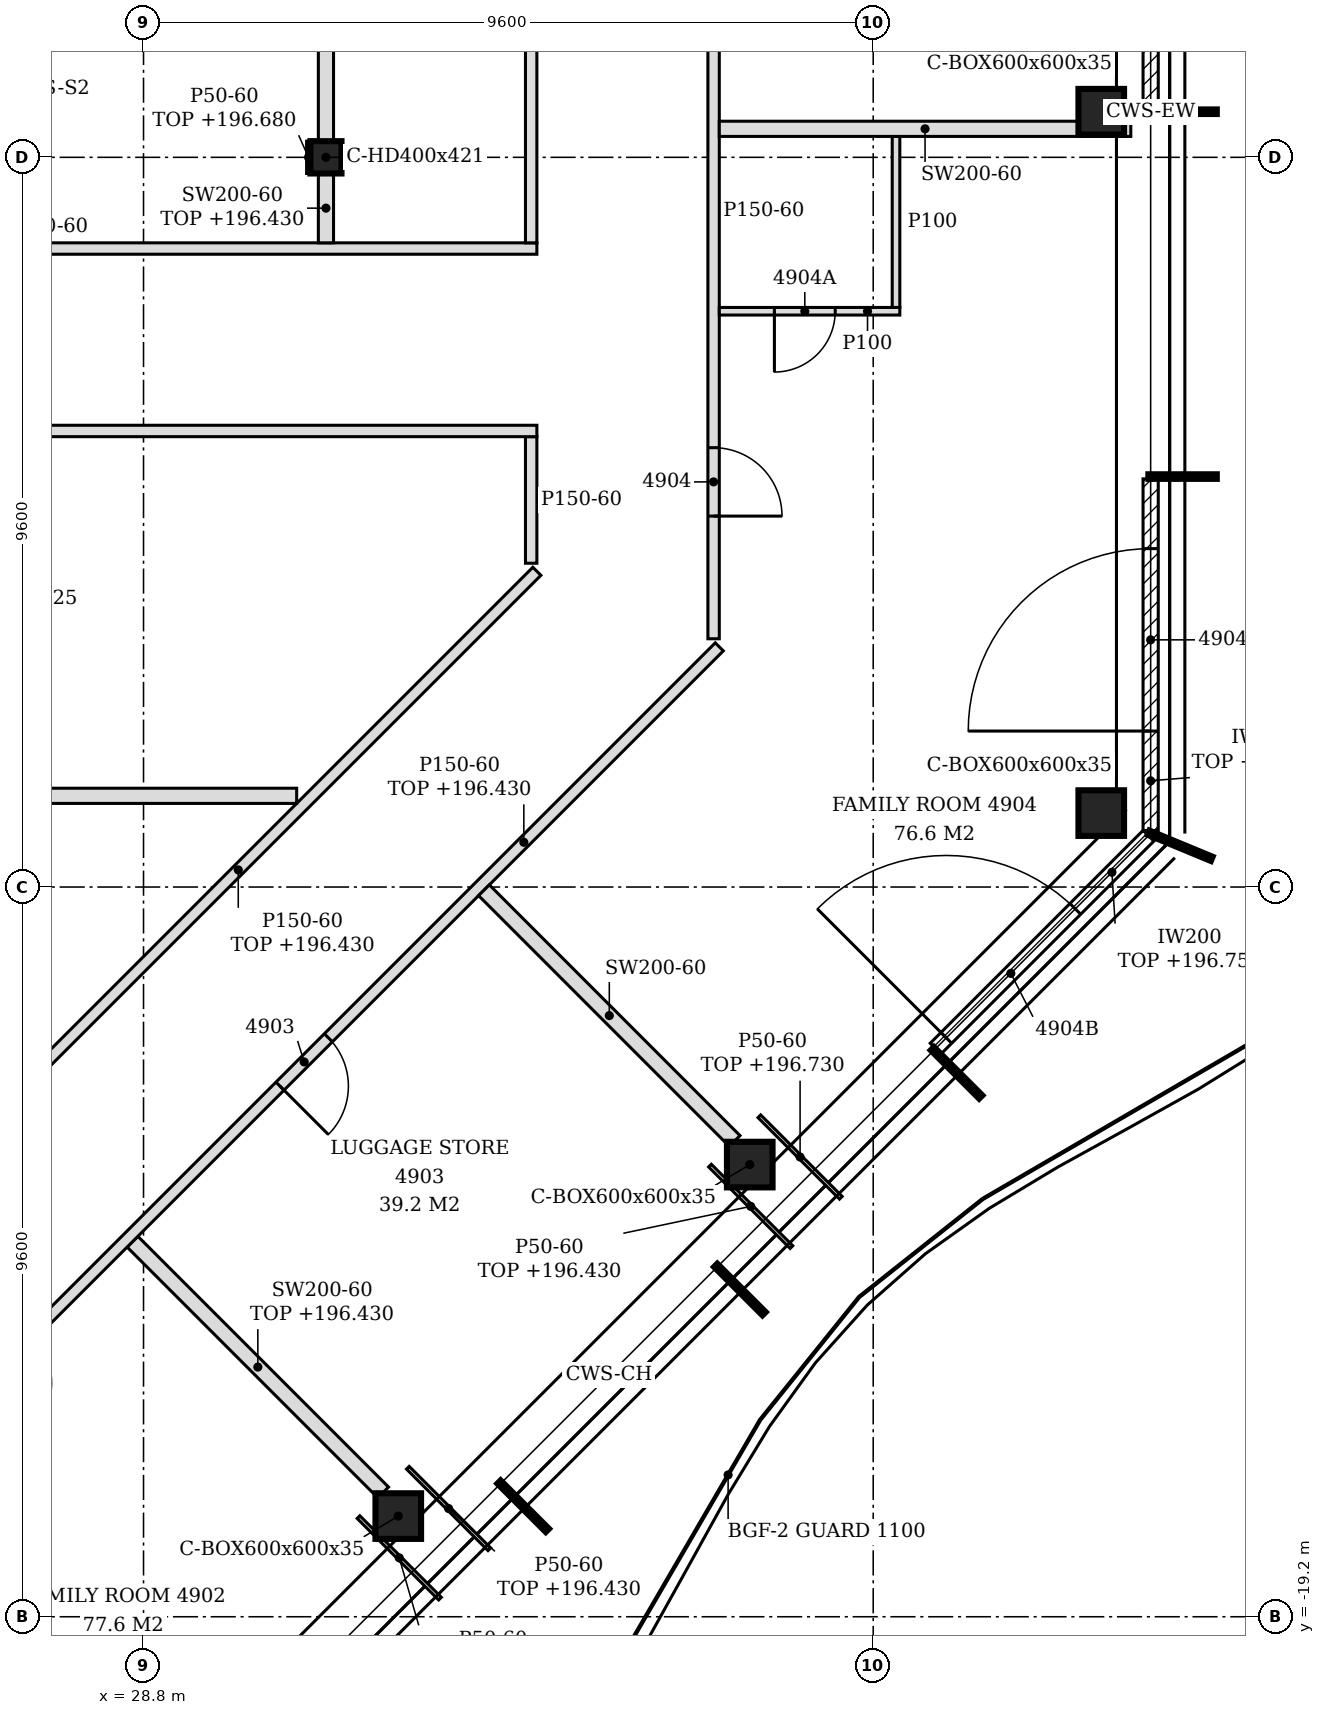
"""IFC4 building model, lengths in metres.
Left out: names, types, materials, properties, quantities, classifications, styles, units other than length and angle.
Written with IfcOpenShell. Run it as: python <this file> out.ifc"""

import sys

from ifc_helpers import new_model, si_unit, direction, frame, frame_2d, origin, origin_2d, place, context, subcontext, project, spatial, polyline, rectangle, hollow_rectangle, i_section, outline, extrude, clip, halfspace, element, fill, save


model = new_model("IFC4")
c1 = context("Model", 3, precision=1e-05, world=origin(), true_north=direction((0.0, 1.0)))
c2 = subcontext(c1, "Body", "Model", "MODEL_VIEW")
j1 = project(units=[si_unit("LENGTHUNIT", "METRE"), si_unit("PLANEANGLEUNIT", "RADIAN")], contexts=[c1])
p1 = place(None, origin())
s1 = spatial("IfcSite", under=j1, at=p1, CompositionType="ELEMENT")
p2 = place(p1, origin())
s2 = spatial("IfcBuilding", under=s1, at=p2, CompositionType="ELEMENT")
p3 = place(p2, frame((0.0, 0.0, 193.8)))
s3 = spatial("IfcBuildingStorey", under=s2, at=p3, CompositionType="ELEMENT", Elevation=193.8)
p4 = place(p3, frame((32.152, -17.876, -0.15), z_axis=(0.182857646312, -0.121927149838, 0.975549512489), x_axis=(0.554769659169, 0.83200398152, 0.0)))
e1 = element("IfcColumn", 1, at=p4, inside=s3, PredefinedType="COLUMN", context=c2, shape_type="Clipping", body=[
    clip(clip(extrude(hollow_rectangle(XDim=0.6, YDim=0.6, WallThickness=0.035, at=origin_2d()), origin(), (0.0, 0.0, 1.0), 3.69), halfspace(frame((0.0, 0.0, 0.021), z_axis=(0.0, 0.0, 1.0), x_axis=(1.0, 0.0, 0.0)), True)), halfspace(frame((0.0, 0.0, 3.668), z_axis=(0.0, 0.0, 1.0), x_axis=(1.0, 0.0, 0.0)), False)),
])
for number, where, z_axis, x_axis in (
    (2, (36.776, -13.251, -0.15), (0.183, -0.122, 0.976), (0.555, 0.832, 0.0)),
    (3, (41.4, -8.627, -0.15), (0.183, -0.122, 0.976), (0.555, 0.832, 0.0)),
    (4, (41.4, 0.6, -0.15), (0.183, -0.122, 0.976), (0.555, 0.832, 0.0)),
):
    element("IfcColumn", number, at=place(p3, frame(where, z_axis=z_axis, x_axis=x_axis)), inside=s3, PredefinedType="COLUMN", context=c2, shape_type="Clipping", body=[
        clip(clip(extrude(hollow_rectangle(XDim=0.6, YDim=0.6, WallThickness=0.035, at=origin_2d()), origin(), (0.0, 0.0, 1.0), 3.69), halfspace(frame((0.0, 0.0, 0.021), z_axis=(0.0, 0.0, 1.0), x_axis=(1.0, 0.0, 0.0)), True)), halfspace(frame((0.0, 0.0, 3.668), z_axis=(0.0, 0.0, 1.0), x_axis=(1.0, 0.0, 0.0)), False)),
    ])
p5 = place(p3, frame((31.2, 0.0, -0.15), z_axis=(0.0, 0.0, 1.0), x_axis=(1.0, 0.0, 0.0)))
e5 = element("IfcColumn", 5, at=p5, inside=s3, PredefinedType="COLUMN", context=c2, shape_type="SweptSolid", body=[
    extrude(i_section(OverallWidth=0.409, OverallDepth=0.425, WebThickness=0.033, FlangeThickness=0.052, FilletRadius=0.015, at=origin_2d()), origin(), (0.0, 0.0, 1.0), 3.6),
])
p6 = place(p3, frame((39.22, -11.726, 0.0), z_axis=(0.0, 0.0, 1.0), x_axis=(0.707137595296, 0.707075965734, 0.0)))
e6 = element("IfcWall", 6, at=p6, inside=s3, PredefinedType="NOTDEFINED", context=c2, shape_type="SweptSolid", body=[
    extrude(rectangle(XDim=3.961, YDim=0.2, at=frame_2d((1.981, 0.0))), origin(), (0.0, 0.0, 1.0), 2.95),
])
p7 = place(p6, frame((0.2, 0.0, 0.0)))
e7 = element("IfcOpeningElement", 7, at=p7, cuts=e6, PredefinedType="OPENING", context=c2, shape_type="SweptSolid", body=[
    extrude(rectangle(XDim=2.4, YDim=2.4, at=frame_2d((1.2, 1.2))), frame((0.0, 0.11, 0.0), z_axis=(0.0, -1.0, 0.0), x_axis=(1.0, 0.0, 0.0)), (0.0, 0.0, 1.0), 0.22),
])
p8 = place(p3, frame((42.05, -8.856, 0.0), z_axis=(0.0, 0.0, 1.0), x_axis=(0.0, 1.0, 0.0)))
e8 = element("IfcWall", 8, at=p8, inside=s3, PredefinedType="NOTDEFINED", context=c2, shape_type="SweptSolid", body=[
    extrude(rectangle(XDim=4.626, YDim=0.2, at=frame_2d((2.313, 0.0))), origin(), (0.0, 0.0, 1.0), 2.95),
])
p9 = place(p8, frame((1.308, 0.0, 0.0)))
e9 = element("IfcOpeningElement", 9, at=p9, cuts=e8, PredefinedType="OPENING", context=c2, shape_type="SweptSolid", body=[
    extrude(rectangle(XDim=2.4, YDim=2.4, at=frame_2d((1.2, 1.2))), frame((0.0, 0.11, 0.0), z_axis=(0.0, -1.0, 0.0), x_axis=(1.0, 0.0, 0.0)), (0.0, 0.0, 1.0), 0.22),
])
p10 = place(p3, frame((42.05, 0.63, 0.0), z_axis=(0.0, 0.0, 1.0), x_axis=(0.0, 1.0, 0.0)))
e10 = element("IfcWall", 10, at=p10, inside=s3, PredefinedType="NOTDEFINED", context=c2, shape_type="SweptSolid", body=[
    extrude(rectangle(XDim=4.74, YDim=0.2, at=frame_2d((2.37, 0.0))), origin(), (0.0, 0.0, 1.0), 2.95),
])
p11 = place(p10, frame((1.17, 0.0, 0.0)))
e11 = element("IfcOpeningElement", 11, at=p11, cuts=e10, PredefinedType="OPENING", context=c2, shape_type="SweptSolid", body=[
    extrude(rectangle(XDim=2.4, YDim=2.4, at=frame_2d((1.2, 1.2))), frame((0.0, 0.11, 0.0), z_axis=(0.0, -1.0, 0.0), x_axis=(1.0, 0.0, 0.0)), (0.0, 0.0, 1.0), 0.22),
])
p12 = place(p3, frame((31.953, -17.565, 0.0), z_axis=(0.0, 0.0, 1.0), x_axis=(-0.707028264657, 0.707185288998, 0.0)))
e12 = element("IfcWall", 12, at=p12, inside=s3, PredefinedType="PARTITIONING", context=c2, shape_type="SweptSolid", body=[
    extrude(rectangle(XDim=4.664, YDim=0.2, at=frame_2d((2.332, 0.0))), origin(), (0.0, 0.0, 1.0), 2.63),
])
p13 = place(p3, frame((25.543, -17.272, 0.0), z_axis=(0.0, 0.0, 1.0), x_axis=(0.707106781187, 0.707106781187, 0.0)))
e13 = element("IfcWall", 13, at=p13, inside=s3, PredefinedType="PARTITIONING", context=c2, shape_type="SweptSolid", body=[
    extrude(rectangle(XDim=15.319, YDim=0.15, at=frame_2d((7.659, 0.0))), origin(), (0.0, 0.0, 1.0), 2.63),
])
p14 = place(p13, frame((1.623, 0.0, 0.0)))
e14 = element("IfcOpeningElement", 14, at=p14, cuts=e13, PredefinedType="OPENING", context=c2, shape_type="SweptSolid", body=[
    extrude(rectangle(XDim=0.9, YDim=2.1, at=frame_2d((0.45, 1.05))), frame((0.0, 0.085, 0.0), z_axis=(0.0, -1.0, 0.0), x_axis=(1.0, 0.0, 0.0)), (0.0, 0.0, 1.0), 0.17),
])
p15 = place(p13, frame((7.145, 0.0, 0.0)))
e15 = element("IfcOpeningElement", 15, at=p15, cuts=e13, PredefinedType="OPENING", context=c2, shape_type="SweptSolid", body=[
    extrude(rectangle(XDim=0.9, YDim=2.1, at=frame_2d((0.45, 1.05))), frame((0.0, 0.085, 0.0), z_axis=(0.0, -1.0, 0.0), x_axis=(1.0, 0.0, 0.0)), (0.0, 0.0, 1.0), 0.17),
])
p16 = place(p3, frame((26.118, -13.303, 0.0), z_axis=(0.0, 0.0, 1.0), x_axis=(0.707117766991, 0.707095795212, 0.0)))
e16 = element("IfcWall", 16, at=p16, inside=s3, PredefinedType="PARTITIONING", context=c2, shape_type="SweptSolid", body=[
    extrude(rectangle(XDim=11.112, YDim=0.15, at=frame_2d((5.556, 0.0))), origin(), (0.0, 0.0, 1.0), 2.63),
])
p17 = place(p3, frame((36.577, -12.941, 0.0), z_axis=(0.0, 0.0, 1.0), x_axis=(-0.707028264657, 0.707185288998, 0.0)))
e17 = element("IfcWall", 17, at=p17, inside=s3, PredefinedType="PARTITIONING", context=c2, shape_type="SweptSolid", body=[
    extrude(rectangle(XDim=4.664, YDim=0.2, at=frame_2d((2.332, 0.0))), origin(), (0.0, 0.0, 1.0), 3.45),
])
p18 = place(p3, frame((21.527, -8.4, 0.0), z_axis=(0.0, 0.0, 1.0), x_axis=(1.0, 0.0, 0.0)))
e18 = element("IfcWall", 18, at=p18, inside=s3, PredefinedType="PARTITIONING", context=c2, shape_type="SweptSolid", body=[
    extrude(rectangle(XDim=9.288, YDim=0.2, at=frame_2d((4.644, 0.0))), origin(), (0.0, 0.0, 1.0), 3.45),
])
p19 = place(p3, frame((36.3, -6.334, 0.0), z_axis=(0.0, 0.0, 1.0), x_axis=(0.0, 1.0, 0.0)))
e19 = element("IfcWall", 19, at=p19, inside=s3, PredefinedType="PARTITIONING", context=c2, shape_type="SweptSolid", body=[
    extrude(outline(polyline([(0.0, 0.0), (14.155, 0.0), (14.155, 3.45), (11.384, 3.45), (11.382, 2.93), (11.184, 2.93), (11.182, 3.45), (6.584, 3.45), (6.582, 2.93), (6.384, 2.93), (6.382, 3.45), (1.784, 3.45), (1.782, 2.93), (1.584, 2.93), (1.582, 3.45), (0.0, 3.45), (0.0, 0.0)])), frame((0.0, 0.075, 0.0), z_axis=(0.0, -1.0, 0.0), x_axis=(1.0, 0.0, 0.0)), (0.0, 0.0, 1.0), 0.15),
])
p20 = place(p19, frame((1.614, 0.0, 0.0)))
e20 = element("IfcOpeningElement", 20, at=p20, cuts=e19, PredefinedType="OPENING", context=c2, shape_type="SweptSolid", body=[
    extrude(rectangle(XDim=0.9, YDim=2.1, at=frame_2d((0.45, 1.05))), frame((0.0, 0.085, 0.0), z_axis=(0.0, -1.0, 0.0), x_axis=(1.0, 0.0, 0.0)), (0.0, 0.0, 1.0), 0.17),
])
p21 = place(p19, frame((8.729, 0.0, 0.0)))
e21 = element("IfcOpeningElement", 21, at=p21, cuts=e19, PredefinedType="OPENING", context=c2, shape_type="SweptSolid", body=[
    extrude(rectangle(XDim=0.9, YDim=2.1, at=frame_2d((0.45, 1.05))), frame((0.0, 0.085, 0.0), z_axis=(0.0, -1.0, 0.0), x_axis=(1.0, 0.0, 0.0)), (0.0, 0.0, 1.0), 0.17),
])
p22 = place(p3, frame((33.9, -5.34, 0.0), z_axis=(0.0, 0.0, 1.0), x_axis=(0.0, 1.0, 0.0)))
e22 = element("IfcWall", 22, at=p22, inside=s3, PredefinedType="PARTITIONING", context=c2, shape_type="SweptSolid", body=[
    extrude(outline(polyline([(0.0, 0.0), (1.665, 0.0), (1.665, 3.45), (0.79, 3.45), (0.788, 2.93), (0.59, 2.93), (0.588, 3.45), (0.0, 3.45), (0.0, 0.0)])), frame((0.0, 0.075, 0.0), z_axis=(0.0, -1.0, 0.0), x_axis=(1.0, 0.0, 0.0)), (0.0, 0.0, 1.0), 0.15),
])
p23 = place(p3, frame((19.125, -3.6, 0.0), z_axis=(0.0, 0.0, 1.0), x_axis=(1.0, 0.0, 0.0)))
e23 = element("IfcWall", 23, at=p23, inside=s3, PredefinedType="PARTITIONING", context=c2, shape_type="SweptSolid", body=[
    extrude(outline(polyline([(0.0, 0.0), (14.85, 0.0), (14.85, 3.45), (12.225, 3.45), (12.223, 2.63), (11.925, 2.63), (11.923, 3.45), (0.225, 3.45), (0.223, 2.83), (0.0, 2.83), (0.0, 0.0)])), frame((0.0, 0.075, 0.0), z_axis=(0.0, -1.0, 0.0), x_axis=(1.0, 0.0, 0.0)), (0.0, 0.0, 1.0), 0.15),
])
p24 = place(p23, frame((6.525, 0.0, 0.0)))
e24 = element("IfcOpeningElement", 24, at=p24, cuts=e23, PredefinedType="OPENING", context=c2, shape_type="SweptSolid", body=[
    extrude(rectangle(XDim=1.8, YDim=2.1, at=frame_2d((0.9, 1.05))), frame((0.0, 0.085, 0.0), z_axis=(0.0, -1.0, 0.0), x_axis=(1.0, 0.0, 0.0)), (0.0, 0.0, 1.0), 0.17),
])
p25 = place(p3, frame((36.375, -2.025, 0.0), z_axis=(0.0, 0.0, 1.0), x_axis=(1.0, 0.0, 0.0)))
e25 = element("IfcWall", 25, at=p25, inside=s3, PredefinedType="PARTITIONING", context=c2, shape_type="SweptSolid", body=[
    extrude(rectangle(XDim=2.375, YDim=0.1, at=frame_2d((1.188, 0.0))), origin(), (0.0, 0.0, 1.0), 3.45),
])
p26 = place(p25, frame((0.725, 0.0, 0.0)))
e26 = element("IfcOpeningElement", 26, at=p26, cuts=e25, PredefinedType="OPENING", context=c2, shape_type="SweptSolid", body=[
    extrude(rectangle(XDim=0.8, YDim=2.1, at=frame_2d((0.4, 1.05))), frame((0.0, 0.06, 0.0), z_axis=(0.0, -1.0, 0.0), x_axis=(1.0, 0.0, 0.0)), (0.0, 0.0, 1.0), 0.12),
])
p27 = place(p3, frame((38.7, -1.975, 0.0), z_axis=(0.0, 0.0, 1.0), x_axis=(0.0, 1.0, 0.0)))
e27 = element("IfcWall", 27, at=p27, inside=s3, PredefinedType="PARTITIONING", context=c2, shape_type="SweptSolid", body=[
    extrude(outline(polyline([(0.0, 0.0), (2.25, 0.0), (2.25, 3.45), (2.225, 3.45), (2.223, 2.93), (2.025, 2.93), (2.023, 3.45), (0.0, 3.45), (0.0, 0.0)])), frame((0.0, 0.05, 0.0), z_axis=(0.0, -1.0, 0.0), x_axis=(1.0, 0.0, 0.0)), (0.0, 0.0, 1.0), 0.1),
])
p28 = place(p3, frame((19.125, -1.2, 0.0), z_axis=(0.0, 0.0, 1.0), x_axis=(1.0, 0.0, 0.0)))
e28 = element("IfcWall", 28, at=p28, inside=s3, PredefinedType="PARTITIONING", context=c2, shape_type="SweptSolid", body=[
    extrude(outline(polyline([(0.0, 0.0), (14.85, 0.0), (14.85, 3.45), (12.225, 3.45), (12.223, 2.63), (11.925, 2.63), (11.923, 3.45), (0.225, 3.45), (0.223, 2.83), (0.0, 2.83), (0.0, 0.0)])), frame((0.0, 0.075, 0.0), z_axis=(0.0, -1.0, 0.0), x_axis=(1.0, 0.0, 0.0)), (0.0, 0.0, 1.0), 0.15),
])
p29 = place(p28, frame((1.175, 0.0, 0.0)))
e29 = element("IfcOpeningElement", 29, at=p29, cuts=e28, PredefinedType="OPENING", context=c2, shape_type="SweptSolid", body=[
    extrude(rectangle(XDim=0.8, YDim=2.1, at=frame_2d((0.4, 1.05))), frame((0.0, 0.085, 0.0), z_axis=(0.0, -1.0, 0.0), x_axis=(1.0, 0.0, 0.0)), (0.0, 0.0, 1.0), 0.17),
])
p30 = place(p3, frame((31.2, -1.125, 0.0), z_axis=(0.0, 0.0, 1.0), x_axis=(0.0, 1.0, 0.0)))
e30 = element("IfcWall", 30, at=p30, inside=s3, PredefinedType="PARTITIONING", context=c2, shape_type="SweptSolid", body=[
    extrude(rectangle(XDim=0.913, YDim=0.2, at=frame_2d((0.456, 0.0))), origin(), (0.0, 0.0, 1.0), 2.63),
])
p31 = place(p3, frame((33.9, -1.125, 0.0), z_axis=(0.0, 0.0, 1.0), x_axis=(0.0, 1.0, 0.0)))
e31 = element("IfcWall", 31, at=p31, inside=s3, PredefinedType="PARTITIONING", context=c2, shape_type="SweptSolid", body=[
    extrude(outline(polyline([(0.0, 0.0), (7.952, 0.0), (7.952, 3.45), (6.175, 3.45), (6.173, 2.93), (5.975, 2.93), (5.973, 3.45), (1.375, 3.45), (1.373, 2.93), (1.175, 2.93), (1.173, 3.45), (0.0, 3.45), (0.0, 0.0)])), frame((0.0, 0.075, 0.0), z_axis=(0.0, -1.0, 0.0), x_axis=(1.0, 0.0, 0.0)), (0.0, 0.0, 1.0), 0.15),
])
p32 = place(p31, frame((3.435, 0.0, 0.0)))
e32 = element("IfcOpeningElement", 32, at=p32, cuts=e31, PredefinedType="OPENING", context=c2, shape_type="SweptSolid", body=[
    extrude(rectangle(XDim=0.9, YDim=2.1, at=frame_2d((0.45, 1.05))), frame((0.0, 0.085, 0.0), z_axis=(0.0, -1.0, 0.0), x_axis=(1.0, 0.0, 0.0)), (0.0, 0.0, 1.0), 0.17),
])
p33 = place(p3, frame((31.2, 0.212, 0.0), z_axis=(0.0, 0.0, 1.0), x_axis=(0.0, 1.0, 0.0)))
e33 = element("IfcWall", 33, at=p33, inside=s3, PredefinedType="PARTITIONING", context=c2, shape_type="SweptSolid", body=[
    extrude(rectangle(XDim=9.175, YDim=0.2, at=frame_2d((4.587, 0.0))), origin(), (0.0, 0.0, 1.0), 2.93),
])
p34 = place(p3, frame((36.375, 0.375, 0.0), z_axis=(0.0, 0.0, 1.0), x_axis=(1.0, 0.0, 0.0)))
e34 = element("IfcWall", 34, at=p34, inside=s3, PredefinedType="PARTITIONING", context=c2, shape_type="SweptSolid", body=[
    extrude(outline(polyline([(0.0, 0.0), (4.672, 0.0), (4.792, 0.863), (4.954, 1.725), (5.18, 2.587), (5.414, 3.45), (0.0, 3.45), (0.0, 2.587), (0.0, 1.725), (0.0, 0.863), (0.0, 0.0)])), frame((0.0, 0.1, 0.0), z_axis=(0.0, -1.0, 0.0), x_axis=(1.0, 0.0, 0.0)), (0.0, 0.0, 1.0), 0.2),
])
p35 = place(p3, frame((32.7, -18.961, 0.0), z_axis=(0.0, 0.0, 1.0), x_axis=(-0.707026268033, 0.707187285174, 0.0)))
e35 = element("IfcWall", 35, at=p35, inside=s3, PredefinedType="PARTITIONING", context=c2, shape_type="SweptSolid", body=[
    extrude(rectangle(XDim=1.516, YDim=0.05, at=frame_2d((0.758, 0.0))), origin(), (0.0, 0.0, 1.0), 2.93),
])
p36 = place(p3, frame((33.35, -18.312, 0.0), z_axis=(0.0, 0.0, 1.0), x_axis=(-0.707026268033, 0.707187285174, 0.0)))
e36 = element("IfcWall", 36, at=p36, inside=s3, PredefinedType="PARTITIONING", context=c2, shape_type="SweptSolid", body=[
    extrude(rectangle(XDim=1.516, YDim=0.05, at=frame_2d((0.758, 0.0))), origin(), (0.0, 0.0, 1.0), 2.63),
])
p37 = place(p3, frame((37.974, -13.688, 0.0), z_axis=(0.0, 0.0, 1.0), x_axis=(-0.707026268033, 0.707187285174, 0.0)))
e37 = element("IfcWall", 37, at=p37, inside=s3, PredefinedType="PARTITIONING", context=c2, shape_type="SweptSolid", body=[
    extrude(rectangle(XDim=1.516, YDim=0.05, at=frame_2d((0.758, 0.0))), origin(), (0.0, 0.0, 1.0), 2.93),
])
p38 = place(p3, frame((37.325, -14.337, 0.0), z_axis=(0.0, 0.0, 1.0), x_axis=(-0.707026286363, 0.707187266848, 0.0)))
e38 = element("IfcWall", 38, at=p38, inside=s3, PredefinedType="PARTITIONING", context=c2, shape_type="SweptSolid", body=[
    extrude(rectangle(XDim=1.517, YDim=0.05, at=frame_2d((0.758, 0.0))), origin(), (0.0, 0.0, 1.0), 2.63),
])
p39 = place(p3, frame((30.97, -0.212, 0.0), z_axis=(0.0, 0.0, 1.0), x_axis=(0.0, 1.0, 0.0)))
e39 = element("IfcWall", 39, at=p39, inside=s3, PredefinedType="PARTITIONING", context=c2, shape_type="SweptSolid", body=[
    extrude(rectangle(XDim=0.425, YDim=0.05, at=frame_2d((0.212, 0.0))), origin(), (0.0, 0.0, 1.0), 2.88),
])
p40 = place(p7, origin())
e40 = element("IfcDoor", 40, at=p40, inside=s3, OperationType="SINGLE_SWING_LEFT", PredefinedType="DOOR", context=c2, shape_type="SweptSolid", body=[
    extrude(rectangle(XDim=2.4, YDim=2.4, at=frame_2d((1.2, 1.2))), frame((0.0, 0.025, 0.0), z_axis=(0.0, -1.0, 0.0), x_axis=(1.0, 0.0, 0.0)), (0.0, 0.0, 1.0), 0.05),
])
fill(e7, e40)
p41 = place(p9, origin())
e41 = element("IfcDoor", 41, at=p41, inside=s3, OperationType="SINGLE_SWING_LEFT", PredefinedType="DOOR", context=c2, shape_type="SweptSolid", body=[
    extrude(rectangle(XDim=2.4, YDim=2.4, at=frame_2d((1.2, 1.2))), frame((0.0, 0.025, 0.0), z_axis=(0.0, -1.0, 0.0), x_axis=(1.0, 0.0, 0.0)), (0.0, 0.0, 1.0), 0.05),
])
fill(e9, e41)
p42 = place(p15, frame((0.9, 0.0, 0.0), z_axis=(0.0, 0.0, 1.0), x_axis=(-1.0, 0.0, 0.0)))
e42 = element("IfcDoor", 42, at=p42, inside=s3, OperationType="SINGLE_SWING_RIGHT", PredefinedType="DOOR", context=c2, shape_type="SweptSolid", body=[
    extrude(rectangle(XDim=0.9, YDim=2.1, at=frame_2d((0.45, 1.05))), frame((0.0, 0.025, 0.0), z_axis=(0.0, -1.0, 0.0), x_axis=(1.0, 0.0, 0.0)), (0.0, 0.0, 1.0), 0.05),
])
fill(e15, e42)
p43 = place(p20, frame((0.9, 0.0, 0.0), z_axis=(0.0, 0.0, 1.0), x_axis=(-1.0, 0.0, 0.0)))
e43 = element("IfcDoor", 43, at=p43, inside=s3, OperationType="SINGLE_SWING_RIGHT", PredefinedType="DOOR", context=c2, shape_type="SweptSolid", body=[
    extrude(rectangle(XDim=0.9, YDim=2.1, at=frame_2d((0.45, 1.05))), frame((0.0, 0.025, 0.0), z_axis=(0.0, -1.0, 0.0), x_axis=(1.0, 0.0, 0.0)), (0.0, 0.0, 1.0), 0.05),
])
fill(e20, e43)
p44 = place(p26, frame((0.8, 0.0, 0.0), z_axis=(0.0, 0.0, 1.0), x_axis=(-1.0, 0.0, 0.0)))
e44 = element("IfcDoor", 44, at=p44, inside=s3, OperationType="SINGLE_SWING_RIGHT", PredefinedType="DOOR", context=c2, shape_type="SweptSolid", body=[
    extrude(rectangle(XDim=0.8, YDim=2.1, at=frame_2d((0.4, 1.05))), frame((0.0, 0.025, 0.0), z_axis=(0.0, -1.0, 0.0), x_axis=(1.0, 0.0, 0.0)), (0.0, 0.0, 1.0), 0.05),
])
fill(e26, e44)
save(model, sys.argv[1])
